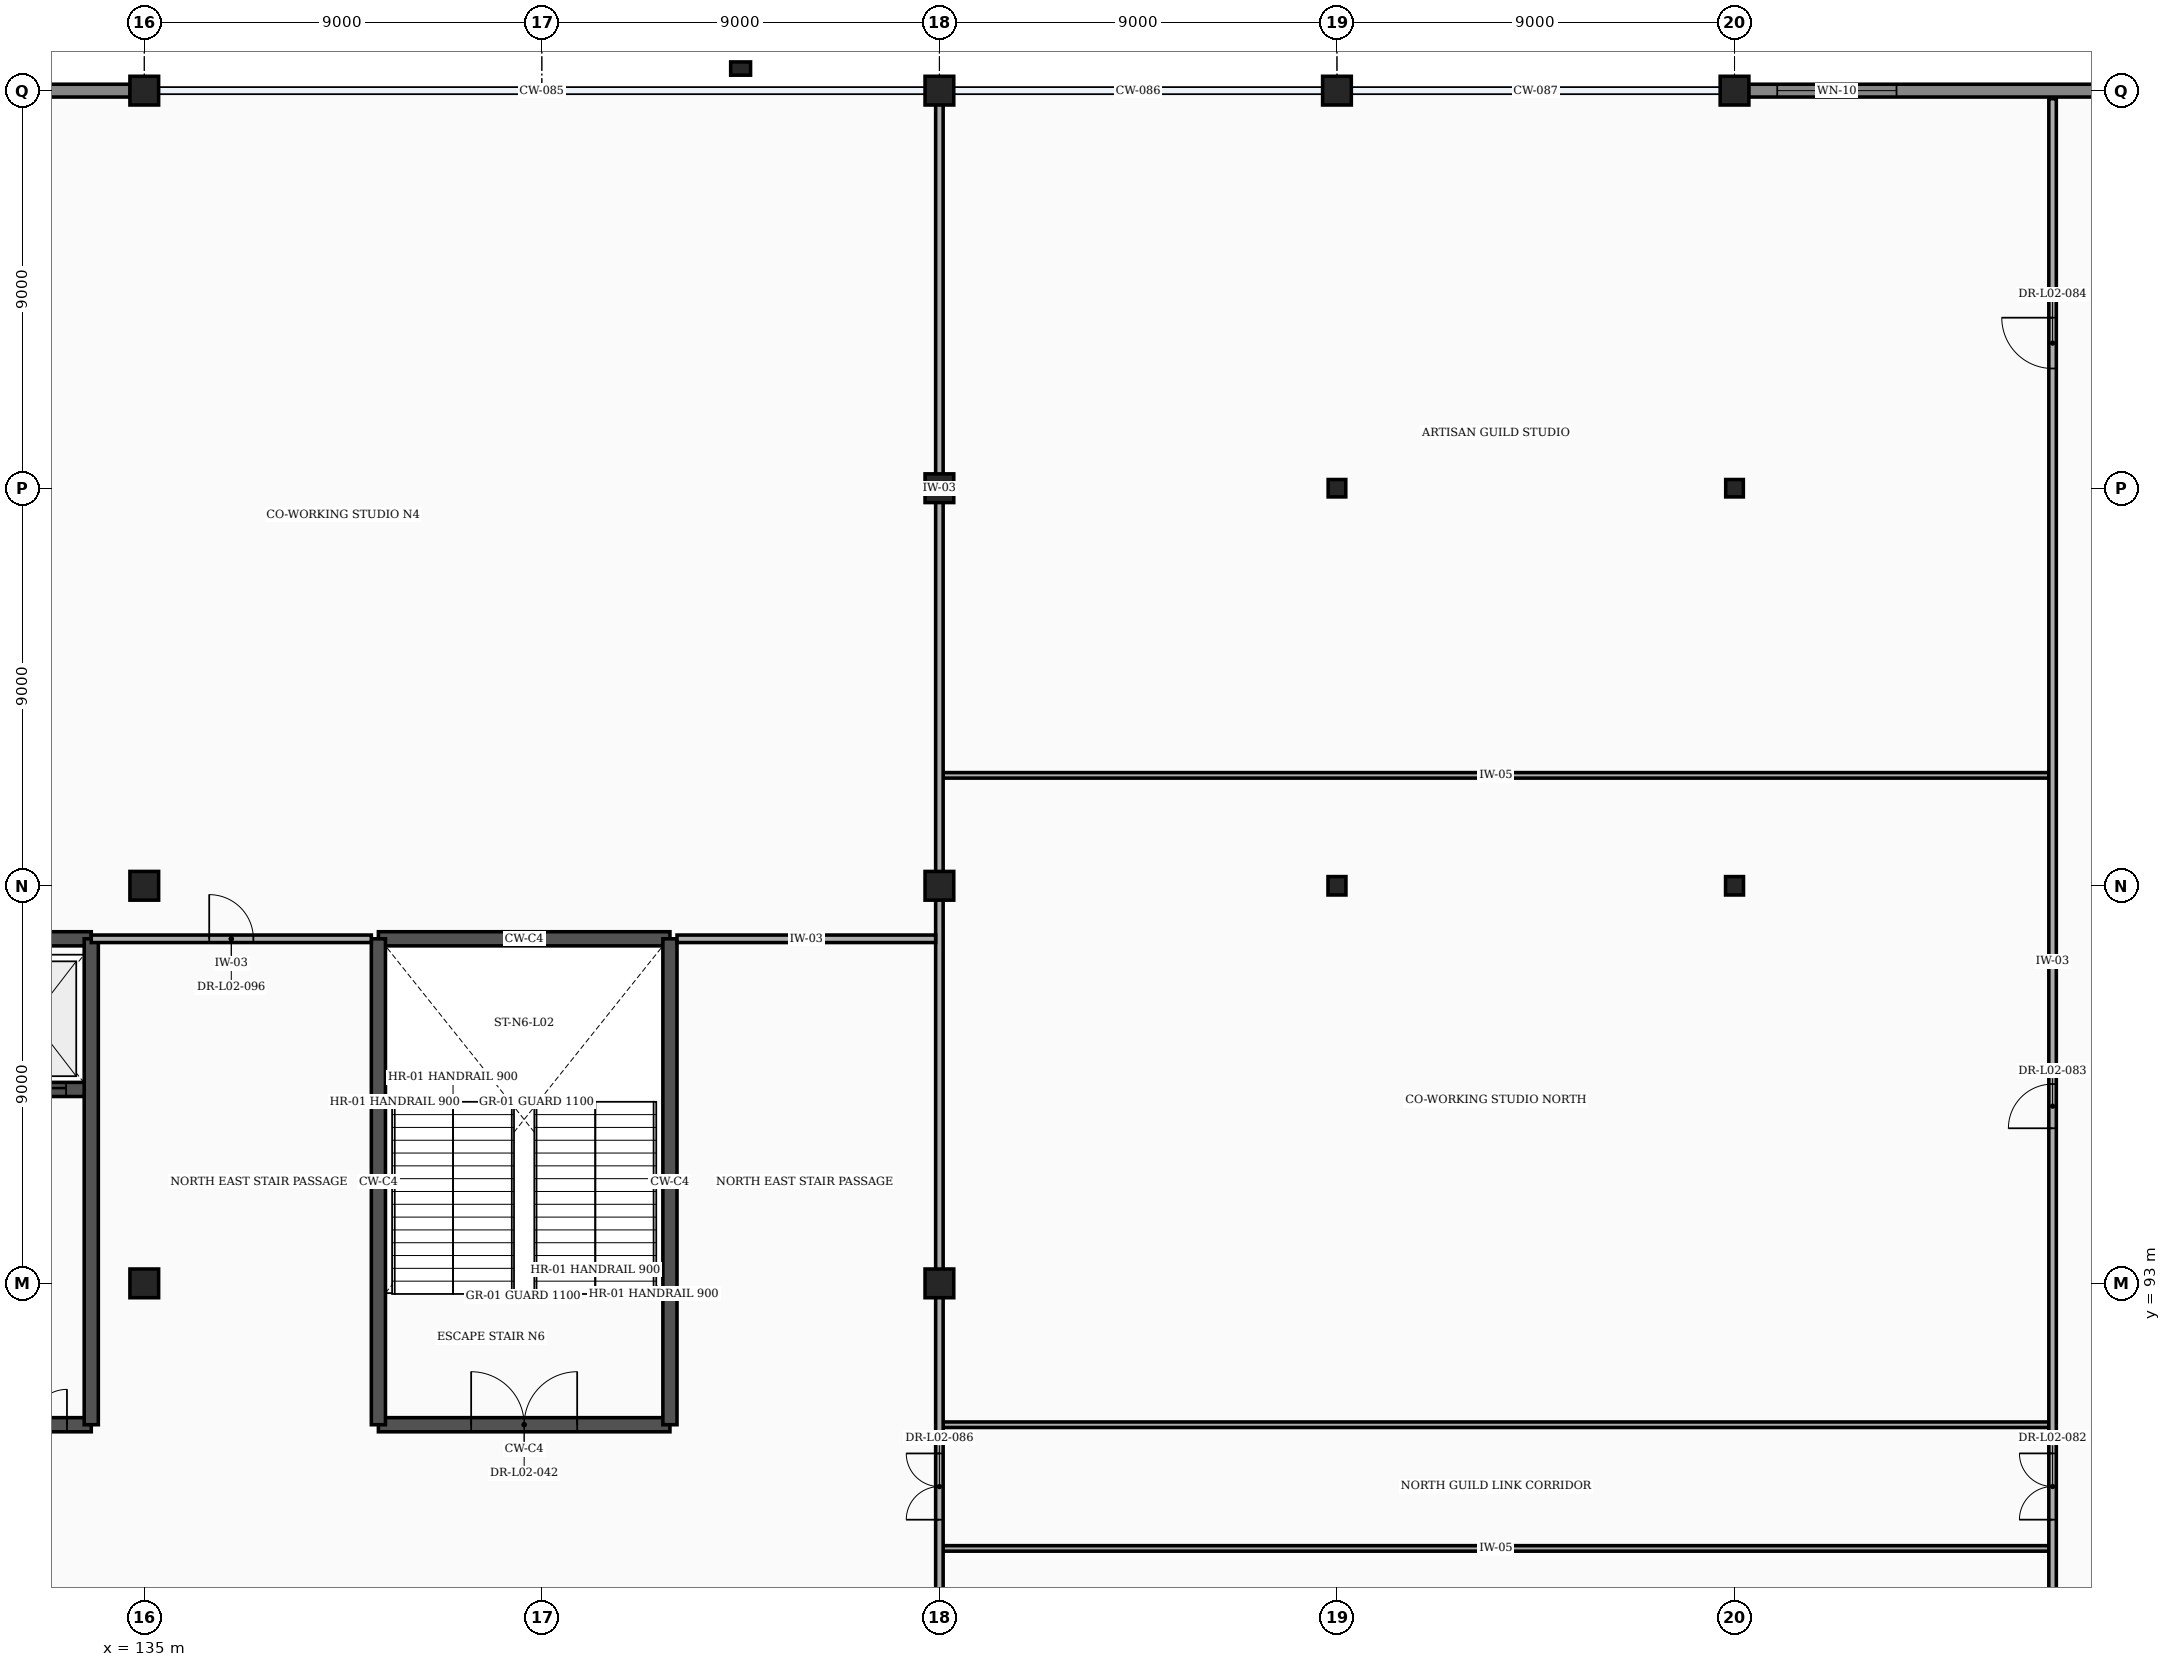
"""IFC4 building model, lengths in metres.
Left out: names, types, materials, properties, quantities, classifications, styles, units other than length and angle.
Written with IfcOpenShell. Run it as: python <this file> out.ifc"""

import sys

from ifc_helpers import new_model, si_unit, direction, frame, frame_2d, origin, origin_2d, place, context, subcontext, project, spatial, rectangle, i_section, extrude, element, fill, save


model = new_model("IFC4")
c1 = context("Model", 3, precision=1e-05, world=origin(), true_north=direction((0.0, 1.0)))
c2 = subcontext(c1, "Body", "Model", "MODEL_VIEW")
j1 = project(units=[si_unit("LENGTHUNIT", "METRE"), si_unit("PLANEANGLEUNIT", "RADIAN")], contexts=[c1])
p1 = place(None, origin())
s1 = spatial("IfcSite", under=j1, at=p1, CompositionType="ELEMENT")
p2 = place(p1, origin())
s2 = spatial("IfcBuilding", under=s1, at=p2, CompositionType="ELEMENT")
p3 = place(p2, frame((0.0, 0.0, 11.4)))
s3 = spatial("IfcBuildingStorey", under=s2, at=p3, CompositionType="ELEMENT", Elevation=11.4)
for number, where, z_axis, x_axis in (
    (1, (135.0, 93.0, 0.0), (0.0, 0.0, 1.0), (1.0, 0.0, 0.0)),
    (2, (135.0, 102.0, 0.0), (0.0, 0.0, 1.0), (1.0, 0.0, 0.0)),
    (3, (135.0, 120.0, 0.0), (0.0, 0.0, 1.0), (1.0, 0.0, 0.0)),
    (4, (153.0, 93.0, 0.0), (0.0, 0.0, 1.0), (1.0, 0.0, 0.0)),
    (5, (153.0, 102.0, 0.0), (0.0, 0.0, 1.0), (1.0, 0.0, 0.0)),
    (6, (153.0, 111.0, 0.0), (0.0, 0.0, 1.0), (1.0, 0.0, 0.0)),
    (7, (153.0, 120.0, 0.0), (0.0, 0.0, 1.0), (1.0, 0.0, 0.0)),
):
    element("IfcColumn", number, at=place(p3, frame(where, z_axis=z_axis, x_axis=x_axis)), inside=s3, PredefinedType="COLUMN", context=c2, shape_type="SweptSolid", body=[
        extrude(rectangle(XDim=0.65, YDim=0.65, at=origin_2d()), origin(), (0.0, 0.0, 1.0), 5.4),
    ])
p4 = place(p3, frame((162.0, 102.0, 0.0), z_axis=(0.0, 0.0, 1.0), x_axis=(1.0, 0.0, 0.0)))
e8 = element("IfcColumn", 8, at=p4, inside=s3, PredefinedType="COLUMN", context=c2, shape_type="SweptSolid", body=[
    extrude(i_section(OverallWidth=0.406, OverallDepth=0.416, WebThickness=0.03, FlangeThickness=0.048, at=origin_2d()), origin(), (0.0, 0.0, 1.0), 5.4),
])
p5 = place(p3, frame((162.0, 111.0, 0.0), z_axis=(0.0, 0.0, 1.0), x_axis=(1.0, 0.0, 0.0)))
e9 = element("IfcColumn", 9, at=p5, inside=s3, PredefinedType="COLUMN", context=c2, shape_type="SweptSolid", body=[
    extrude(i_section(OverallWidth=0.399, OverallDepth=0.394, WebThickness=0.023, FlangeThickness=0.037, at=origin_2d()), origin(), (0.0, 0.0, 1.0), 5.4),
])
p6 = place(p3, frame((162.0, 120.0, 0.0), z_axis=(0.0, 0.0, 1.0), x_axis=(1.0, 0.0, 0.0)))
e10 = element("IfcColumn", 10, at=p6, inside=s3, PredefinedType="COLUMN", context=c2, shape_type="SweptSolid", body=[
    extrude(rectangle(XDim=0.65, YDim=0.65, at=origin_2d()), origin(), (0.0, 0.0, 1.0), 5.4),
])
p7 = place(p3, frame((171.0, 102.0, 0.0), z_axis=(0.0, 0.0, 1.0), x_axis=(1.0, 0.0, 0.0)))
e11 = element("IfcColumn", 11, at=p7, inside=s3, PredefinedType="COLUMN", context=c2, shape_type="SweptSolid", body=[
    extrude(i_section(OverallWidth=0.406, OverallDepth=0.416, WebThickness=0.03, FlangeThickness=0.048, at=origin_2d()), origin(), (0.0, 0.0, 1.0), 5.4),
])
p8 = place(p3, frame((171.0, 111.0, 0.0), z_axis=(0.0, 0.0, 1.0), x_axis=(1.0, 0.0, 0.0)))
e12 = element("IfcColumn", 12, at=p8, inside=s3, PredefinedType="COLUMN", context=c2, shape_type="SweptSolid", body=[
    extrude(i_section(OverallWidth=0.399, OverallDepth=0.394, WebThickness=0.023, FlangeThickness=0.037, at=origin_2d()), origin(), (0.0, 0.0, 1.0), 5.4),
])
p9 = place(p3, frame((171.0, 120.0, 0.0), z_axis=(0.0, 0.0, 1.0), x_axis=(1.0, 0.0, 0.0)))
e13 = element("IfcColumn", 13, at=p9, inside=s3, PredefinedType="COLUMN", context=c2, shape_type="SweptSolid", body=[
    extrude(rectangle(XDim=0.65, YDim=0.65, at=origin_2d()), origin(), (0.0, 0.0, 1.0), 5.4),
])
p10 = place(p3, frame((148.5, 120.5, 0.0), z_axis=(0.0, 0.0, 1.0), x_axis=(1.0, 0.0, 0.0)))
e14 = element("IfcColumn", 14, at=p10, inside=s3, PredefinedType="PILASTER", context=c2, shape_type="SweptSolid", body=[
    extrude(rectangle(XDim=0.45, YDim=0.3, at=origin_2d()), origin(), (0.0, 0.0, 1.0), 5.4),
])
p11 = place(p3, frame((117.317, 120.0, 0.0), z_axis=(0.0, 0.0, 1.0), x_axis=(1.0, 0.0, 0.0)))
e15 = element("IfcWall", 15, at=p11, inside=s3, PredefinedType="STANDARD", context=c2, shape_type="SweptSolid", body=[
    extrude(rectangle(XDim=17.366, YDim=0.29, at=frame_2d((8.683, 0.0))), origin(), (0.0, 0.0, 1.0), 4.38),
])
p12 = place(p11, frame((0.65, 0.0, 0.85)))
e16 = element("IfcOpeningElement", 16, at=p12, cuts=e15, PredefinedType="OPENING", context=c2, shape_type="SweptSolid", body=[
    extrude(rectangle(XDim=2.7, YDim=2.4, at=frame_2d((1.35, 1.2))), frame((0.0, 0.157, 0.0), z_axis=(0.0, -1.0, 0.0), x_axis=(1.0, 0.0, 0.0)), (0.0, 0.0, 1.0), 0.314),
])
p13 = place(p3, frame((171.317, 120.0, 0.0), z_axis=(0.0, 0.0, 1.0), x_axis=(1.0, 0.0, 0.0)))
e17 = element("IfcWall", 17, at=p13, inside=s3, PredefinedType="STANDARD", context=c2, shape_type="SweptSolid", body=[
    extrude(rectangle(XDim=17.366, YDim=0.29, at=frame_2d((8.683, 0.0))), origin(), (0.0, 0.0, 1.0), 4.388),
])
p14 = place(p13, frame((0.65, 0.0, 0.85)))
e18 = element("IfcOpeningElement", 18, at=p14, cuts=e17, PredefinedType="OPENING", context=c2, shape_type="SweptSolid", body=[
    extrude(rectangle(XDim=2.7, YDim=2.4, at=frame_2d((1.35, 1.2))), frame((0.0, 0.157, 0.0), z_axis=(0.0, -1.0, 0.0), x_axis=(1.0, 0.0, 0.0)), (0.0, 0.0, 1.0), 0.314),
])
p15 = place(p3, frame((127.2, 89.8, 0.0), z_axis=(0.0, 0.0, 1.0), x_axis=(1.0, 0.0, 0.0)))
e19 = element("IfcWall", 19, at=p15, inside=s3, PredefinedType="SHEAR", context=c2, shape_type="SweptSolid", body=[
    extrude(rectangle(XDim=6.6, YDim=0.32, at=frame_2d((3.3, 0.0))), origin(), (0.0, 0.0, 1.0), 5.15),
])
p16 = place(p15, frame((4.45, 0.0, 0.0)))
e20 = element("IfcOpeningElement", 20, at=p16, cuts=e19, PredefinedType="OPENING", context=c2, shape_type="SweptSolid", body=[
    extrude(rectangle(XDim=1.6, YDim=2.3, at=frame_2d((0.8, 1.15))), frame((0.0, 0.172, 0.0), z_axis=(0.0, -1.0, 0.0), x_axis=(1.0, 0.0, 0.0)), (0.0, 0.0, 1.0), 0.344),
])
p17 = place(p3, frame((127.2, 100.8, 0.0), z_axis=(0.0, 0.0, 1.0), x_axis=(1.0, 0.0, 0.0)))
e21 = element("IfcWall", 21, at=p17, inside=s3, PredefinedType="SHEAR", context=c2, shape_type="SweptSolid", body=[
    extrude(rectangle(XDim=6.6, YDim=0.32, at=frame_2d((3.3, 0.0))), origin(), (0.0, 0.0, 1.0), 5.15),
])
p18 = place(p3, frame((133.8, 89.8, 0.0), z_axis=(0.0, 0.0, 1.0), x_axis=(0.0, 1.0, 0.0)))
e22 = element("IfcWall", 22, at=p18, inside=s3, PredefinedType="SHEAR", context=c2, shape_type="SweptSolid", body=[
    extrude(rectangle(XDim=11.0, YDim=0.32, at=frame_2d((5.5, 0.0))), origin(), (0.0, 0.0, 1.0), 5.15),
])
p19 = place(p3, frame((131.28, 97.39, 0.0), z_axis=(0.0, 0.0, 1.0), x_axis=(1.0, 0.0, 0.0)))
e23 = element("IfcWall", 23, at=p19, inside=s3, PredefinedType="SHEAR", context=c2, shape_type="SweptSolid", body=[
    extrude(rectangle(XDim=2.36, YDim=0.32, at=frame_2d((1.18, 0.0))), origin(), (0.0, 0.0, 1.0), 5.15),
])
p20 = place(p19, frame((0.3, 0.0, 0.0)))
e24 = element("IfcOpeningElement", 24, at=p20, cuts=e23, PredefinedType="OPENING", context=c2, shape_type="SweptSolid", body=[
    extrude(rectangle(XDim=1.65, YDim=2.35, at=frame_2d((0.825, 1.175))), frame((0.0, 0.172, 0.0), z_axis=(0.0, -1.0, 0.0), x_axis=(1.0, 0.0, 0.0)), (0.0, 0.0, 1.0), 0.344),
])
p21 = place(p3, frame((140.3, 89.8, 0.0), z_axis=(0.0, 0.0, 1.0), x_axis=(1.0, 0.0, 0.0)))
e25 = element("IfcWall", 25, at=p21, inside=s3, PredefinedType="SHEAR", context=c2, shape_type="SweptSolid", body=[
    extrude(rectangle(XDim=6.6, YDim=0.32, at=frame_2d((3.3, 0.0))), origin(), (0.0, 0.0, 1.0), 5.15),
])
p22 = place(p21, frame((2.1, 0.0, 0.0)))
e26 = element("IfcOpeningElement", 26, at=p22, cuts=e25, PredefinedType="OPENING", context=c2, shape_type="SweptSolid", body=[
    extrude(rectangle(XDim=2.4, YDim=2.25, at=frame_2d((1.2, 1.125))), frame((0.0, 0.172, 0.0), z_axis=(0.0, -1.0, 0.0), x_axis=(1.0, 0.0, 0.0)), (0.0, 0.0, 1.0), 0.344),
])
p23 = place(p3, frame((140.3, 100.8, 0.0), z_axis=(0.0, 0.0, 1.0), x_axis=(1.0, 0.0, 0.0)))
e27 = element("IfcWall", 27, at=p23, inside=s3, PredefinedType="SHEAR", context=c2, shape_type="SweptSolid", body=[
    extrude(rectangle(XDim=6.6, YDim=0.32, at=frame_2d((3.3, 0.0))), origin(), (0.0, 0.0, 1.0), 5.15),
])
for number, where, z_axis, x_axis in (
    (28, (140.3, 89.8, 0.0), (0.0, 0.0, 1.0), (0.0, 1.0, 0.0)),
    (29, (146.9, 89.8, 0.0), (0.0, 0.0, 1.0), (0.0, 1.0, 0.0)),
):
    element("IfcWall", number, at=place(p3, frame(where, z_axis=z_axis, x_axis=x_axis)), inside=s3, PredefinedType="SHEAR", context=c2, shape_type="SweptSolid", body=[
        extrude(rectangle(XDim=11.0, YDim=0.32, at=frame_2d((5.5, 0.0))), origin(), (0.0, 0.0, 1.0), 5.15),
    ])
for number, where, z_axis, x_axis in (
    (30, (153.085, 87.0, 0.0), (0.0, 0.0, 1.0), (1.0, 0.0, 0.0)),
    (31, (153.085, 89.8, 0.0), (0.0, 0.0, 1.0), (1.0, 0.0, 0.0)),
    (32, (153.085, 104.5, 0.0), (0.0, 0.0, 1.0), (1.0, 0.0, 0.0)),
):
    element("IfcWall", number, at=place(p3, frame(where, z_axis=z_axis, x_axis=x_axis)), inside=s3, PredefinedType="PARTITIONING", context=c2, shape_type="SweptSolid", body=[
        extrude(rectangle(XDim=25.03, YDim=0.125, at=frame_2d((12.515, 0.0))), origin(), (0.0, 0.0, 1.0), 5.15),
    ])
p24 = place(p3, frame((178.2, 80.76, 0.0), z_axis=(0.0, 0.0, 1.0), x_axis=(0.0, 1.0, 0.0)))
e33 = element("IfcWall", 33, at=p24, inside=s3, PredefinedType="PARTITIONING", context=c2, shape_type="SweptSolid", body=[
    extrude(rectangle(XDim=39.057, YDim=0.17, at=frame_2d((19.529, 0.0))), origin(), (0.0, 0.0, 1.0), 5.15),
])
p25 = place(p24, frame((6.891, 0.0, 0.0)))
e34 = element("IfcOpeningElement", 34, at=p25, cuts=e33, PredefinedType="OPENING", context=c2, shape_type="SweptSolid", body=[
    extrude(rectangle(XDim=1.5, YDim=2.2, at=frame_2d((0.75, 1.1))), frame((0.0, 0.097, 0.0), z_axis=(0.0, -1.0, 0.0), x_axis=(1.0, 0.0, 0.0)), (0.0, 0.0, 1.0), 0.194),
])
p26 = place(p24, frame((15.751, 0.0, 0.0)))
e35 = element("IfcOpeningElement", 35, at=p26, cuts=e33, PredefinedType="OPENING", context=c2, shape_type="SweptSolid", body=[
    extrude(rectangle(XDim=1.0, YDim=2.15, at=frame_2d((0.5, 1.075))), frame((0.0, 0.097, 0.0), z_axis=(0.0, -1.0, 0.0), x_axis=(1.0, 0.0, 0.0)), (0.0, 0.0, 1.0), 0.194),
])
p27 = place(p24, frame((32.95, 0.0, 0.0)))
e36 = element("IfcOpeningElement", 36, at=p27, cuts=e33, PredefinedType="OPENING", context=c2, shape_type="SweptSolid", body=[
    extrude(rectangle(XDim=1.15, YDim=2.15, at=frame_2d((0.575, 1.075))), frame((0.0, 0.097, 0.0), z_axis=(0.0, -1.0, 0.0), x_axis=(1.0, 0.0, 0.0)), (0.0, 0.0, 1.0), 0.194),
])
p28 = place(p3, frame((153.0, 84.22, 0.0), z_axis=(0.0, 0.0, 1.0), x_axis=(0.0, 1.0, 0.0)))
e37 = element("IfcWall", 37, at=p28, inside=s3, PredefinedType="PARTITIONING", context=c2, shape_type="SweptSolid", body=[
    extrude(rectangle(XDim=8.56, YDim=0.17, at=frame_2d((4.28, 0.0))), origin(), (0.0, 0.0, 1.0), 4.617),
])
p29 = place(p28, frame((3.43, 0.0, 0.0)))
e38 = element("IfcOpeningElement", 38, at=p29, cuts=e37, PredefinedType="OPENING", context=c2, shape_type="SweptSolid", body=[
    extrude(rectangle(XDim=1.5, YDim=2.2, at=frame_2d((0.75, 1.1))), frame((0.0, 0.097, 0.0), z_axis=(0.0, -1.0, 0.0), x_axis=(1.0, 0.0, 0.0)), (0.0, 0.0, 1.0), 0.194),
])
p30 = place(p3, frame((153.0, 93.22, 0.0), z_axis=(0.0, 0.0, 1.0), x_axis=(0.0, 1.0, 0.0)))
e39 = element("IfcWall", 39, at=p30, inside=s3, PredefinedType="PARTITIONING", context=c2, shape_type="SweptSolid", body=[
    extrude(rectangle(XDim=8.56, YDim=0.17, at=frame_2d((4.28, 0.0))), origin(), (0.0, 0.0, 1.0), 4.617),
])
p31 = place(p3, frame((153.0, 102.22, 0.0), z_axis=(0.0, 0.0, 1.0), x_axis=(0.0, 1.0, 0.0)))
e40 = element("IfcWall", 40, at=p31, inside=s3, PredefinedType="PARTITIONING", context=c2, shape_type="SweptSolid", body=[
    extrude(rectangle(XDim=17.56, YDim=0.17, at=frame_2d((8.78, 0.0))), origin(), (0.0, 0.0, 1.0), 4.609),
])
p32 = place(p3, frame((133.8, 100.8, 0.0), z_axis=(0.0, 0.0, 1.0), x_axis=(1.0, 0.0, 0.0)))
e41 = element("IfcWall", 41, at=p32, inside=s3, PredefinedType="PARTITIONING", context=c2, shape_type="SweptSolid", body=[
    extrude(rectangle(XDim=6.34, YDim=0.17, at=frame_2d((3.17, 0.0))), origin(), (0.0, 0.0, 1.0), 5.15),
])
p33 = place(p32, frame((2.67, 0.0, 0.0)))
e42 = element("IfcOpeningElement", 42, at=p33, cuts=e41, PredefinedType="OPENING", context=c2, shape_type="SweptSolid", body=[
    extrude(rectangle(XDim=1.0, YDim=2.15, at=frame_2d((0.5, 1.075))), frame((0.0, 0.097, 0.0), z_axis=(0.0, -1.0, 0.0), x_axis=(1.0, 0.0, 0.0)), (0.0, 0.0, 1.0), 0.194),
])
p34 = place(p3, frame((147.06, 100.8, 0.0), z_axis=(0.0, 0.0, 1.0), x_axis=(1.0, 0.0, 0.0)))
e43 = element("IfcWall", 43, at=p34, inside=s3, PredefinedType="PARTITIONING", context=c2, shape_type="SweptSolid", body=[
    extrude(rectangle(XDim=5.855, YDim=0.17, at=frame_2d((2.927, 0.0))), origin(), (0.0, 0.0, 1.0), 5.15),
])
p35 = place(p14, origin())
e44 = element("IfcWindow", 44, at=p35, inside=s3, PartitioningType="SINGLE_PANEL", PredefinedType="WINDOW", context=c2, shape_type="SweptSolid", body=[
    extrude(rectangle(XDim=2.7, YDim=2.4, at=frame_2d((1.35, 1.2))), frame((0.0, 0.03, 0.0), z_axis=(0.0, -1.0, 0.0), x_axis=(1.0, 0.0, 0.0)), (0.0, 0.0, 1.0), 0.06),
])
fill(e18, e44)
p36 = place(p20, origin())
e45 = element("IfcDoor", 45, at=p36, inside=s3, OperationType="DOUBLE_DOOR_SLIDING", PredefinedType="DOOR", context=c2, shape_type="SweptSolid", body=[
    extrude(rectangle(XDim=1.65, YDim=2.35, at=frame_2d((0.825, 1.175))), frame((0.0, 0.025, 0.0), z_axis=(0.0, -1.0, 0.0), x_axis=(1.0, 0.0, 0.0)), (0.0, 0.0, 1.0), 0.05),
])
fill(e24, e45)
p37 = place(p16, origin())
e46 = element("IfcDoor", 46, at=p37, inside=s3, OperationType="DOUBLE_DOOR_SINGLE_SWING", PredefinedType="DOOR", context=c2, shape_type="SweptSolid", body=[
    extrude(rectangle(XDim=1.6, YDim=2.3, at=frame_2d((0.8, 1.15))), frame((0.0, 0.025, 0.0), z_axis=(0.0, -1.0, 0.0), x_axis=(1.0, 0.0, 0.0)), (0.0, 0.0, 1.0), 0.05),
])
fill(e20, e46)
p38 = place(p22, origin())
e47 = element("IfcDoor", 47, at=p38, inside=s3, OperationType="DOUBLE_DOOR_SINGLE_SWING", PredefinedType="DOOR", context=c2, shape_type="SweptSolid", body=[
    extrude(rectangle(XDim=2.4, YDim=2.25, at=frame_2d((1.2, 1.125))), frame((0.0, 0.025, 0.0), z_axis=(0.0, -1.0, 0.0), x_axis=(1.0, 0.0, 0.0)), (0.0, 0.0, 1.0), 0.05),
])
fill(e26, e47)
p39 = place(p25, origin())
e48 = element("IfcDoor", 48, at=p39, inside=s3, OperationType="DOUBLE_DOOR_SINGLE_SWING", PredefinedType="DOOR", context=c2, shape_type="SweptSolid", body=[
    extrude(rectangle(XDim=1.5, YDim=2.2, at=frame_2d((0.75, 1.1))), frame((0.0, 0.025, 0.0), z_axis=(0.0, -1.0, 0.0), x_axis=(1.0, 0.0, 0.0)), (0.0, 0.0, 1.0), 0.05),
])
fill(e34, e48)
p40 = place(p26, origin())
e49 = element("IfcDoor", 49, at=p40, inside=s3, OperationType="SINGLE_SWING_LEFT", PredefinedType="DOOR", context=c2, shape_type="SweptSolid", body=[
    extrude(rectangle(XDim=1.0, YDim=2.15, at=frame_2d((0.5, 1.075))), frame((0.0, 0.025, 0.0), z_axis=(0.0, -1.0, 0.0), x_axis=(1.0, 0.0, 0.0)), (0.0, 0.0, 1.0), 0.05),
])
fill(e35, e49)
p41 = place(p27, origin())
e50 = element("IfcDoor", 50, at=p41, inside=s3, OperationType="SINGLE_SWING_RIGHT", PredefinedType="DOOR", context=c2, shape_type="SweptSolid", body=[
    extrude(rectangle(XDim=1.15, YDim=2.15, at=frame_2d((0.575, 1.075))), frame((0.0, 0.025, 0.0), z_axis=(0.0, -1.0, 0.0), x_axis=(1.0, 0.0, 0.0)), (0.0, 0.0, 1.0), 0.05),
])
fill(e36, e50)
p42 = place(p29, origin())
e51 = element("IfcDoor", 51, at=p42, inside=s3, OperationType="DOUBLE_DOOR_SINGLE_SWING", PredefinedType="DOOR", context=c2, shape_type="SweptSolid", body=[
    extrude(rectangle(XDim=1.5, YDim=2.2, at=frame_2d((0.75, 1.1))), frame((0.0, 0.025, 0.0), z_axis=(0.0, -1.0, 0.0), x_axis=(1.0, 0.0, 0.0)), (0.0, 0.0, 1.0), 0.05),
])
fill(e38, e51)
p43 = place(p33, origin())
e52 = element("IfcDoor", 52, at=p43, inside=s3, OperationType="SINGLE_SWING_LEFT", PredefinedType="DOOR", context=c2, shape_type="SweptSolid", body=[
    extrude(rectangle(XDim=1.0, YDim=2.15, at=frame_2d((0.5, 1.075))), frame((0.0, 0.025, 0.0), z_axis=(0.0, -1.0, 0.0), x_axis=(1.0, 0.0, 0.0)), (0.0, 0.0, 1.0), 0.05),
])
fill(e42, e52)
save(model, sys.argv[1])
